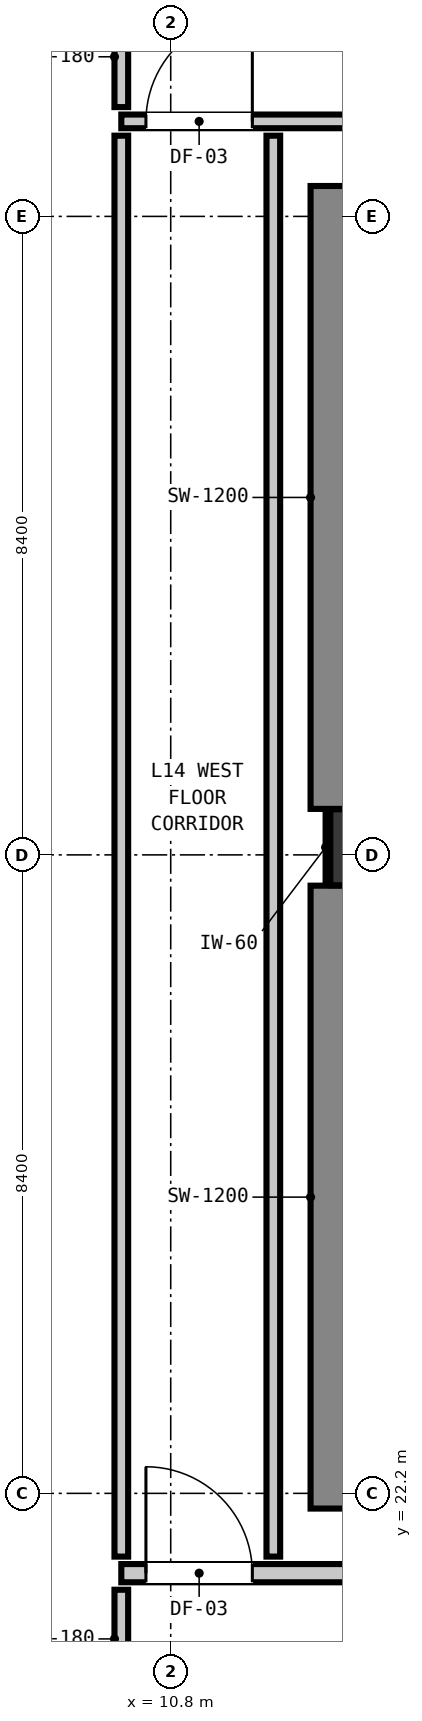
"""IFC4 building model, lengths in metres.
Left out: names, types, materials, properties, quantities, classifications, styles, units other than length and angle.
Written with IfcOpenShell. Run it as: python <this file> out.ifc"""

import sys

from ifc_helpers import new_model, si_unit, direction, frame, frame_2d, origin, origin_2d, place, context, subcontext, project, spatial, rectangle, extrude, element, fill, save


model = new_model("IFC4")
c1 = context("Model", 3, precision=1e-05, world=origin(), true_north=direction((0.0, 1.0)))
c2 = subcontext(c1, "Body", "Model", "MODEL_VIEW")
j1 = project(units=[si_unit("LENGTHUNIT", "METRE"), si_unit("PLANEANGLEUNIT", "RADIAN")], contexts=[c1])
p1 = place(None, origin())
s1 = spatial("IfcSite", under=j1, at=p1, CompositionType="ELEMENT")
p2 = place(p1, origin())
s2 = spatial("IfcBuilding", under=s1, at=p2, CompositionType="ELEMENT")
p3 = place(p2, frame((0.0, 0.0, 51.88)))
s3 = spatial("IfcBuildingStorey", under=s2, at=p3, CompositionType="ELEMENT", Elevation=51.88)
p4 = place(p3, frame((13.4, 30.7, 0.0), z_axis=(0.0, 0.0, 1.0), x_axis=(1.0, 0.0, 0.0)))
e1 = element("IfcColumn", 1, at=p4, inside=s3, PredefinedType="COLUMN", context=c2, shape_type="SweptSolid", body=[
    extrude(rectangle(XDim=1.0, YDim=1.0, at=origin_2d()), origin(), (0.0, 0.0, 1.0), 3.32),
])
p5 = place(p3, frame((13.24, 22.0, 0.0), z_axis=(0.0, 0.0, 1.0), x_axis=(0.0, 1.0, 0.0)))
e2 = element("IfcWall", 2, at=p5, inside=s3, PredefinedType="SHEAR", context=c2, shape_type="SweptSolid", body=[
    extrude(rectangle(XDim=8.195, YDim=1.2, at=frame_2d((4.098, 0.0))), origin(), (0.0, 0.0, 1.0), 3.32),
])
p6 = place(p3, frame((13.24, 31.205, 0.0), z_axis=(0.0, 0.0, 1.0), x_axis=(0.0, 1.0, 0.0)))
e3 = element("IfcWall", 3, at=p6, inside=s3, PredefinedType="SHEAR", context=c2, shape_type="SweptSolid", body=[
    extrude(rectangle(XDim=8.195, YDim=1.2, at=frame_2d((4.097, 0.0))), origin(), (0.0, 0.0, 1.0), 3.32),
])
p7 = place(p3, frame((10.15, 21.15, 0.0), z_axis=(0.0, 0.0, 1.0), x_axis=(1.0, 0.0, 0.0)))
e4 = element("IfcWall", 4, at=p7, inside=s3, PredefinedType="PARTITIONING", context=c2, shape_type="SweptSolid", body=[
    extrude(rectangle(XDim=40.023, YDim=0.24, at=frame_2d((20.012, 0.0))), origin(), (0.0, 0.0, 1.0), 3.06),
])
p8 = place(p7, frame((8.06, 0.0, 0.0)))
e5 = element("IfcOpeningElement", 5, at=p8, cuts=e4, PredefinedType="OPENING", context=c2, shape_type="SweptSolid", body=[
    extrude(rectangle(XDim=1.1, YDim=2.15, at=frame_2d((0.55, 1.075))), frame((0.0, 0.13, 0.0), z_axis=(0.0, -1.0, 0.0), x_axis=(1.0, 0.0, 0.0)), (0.0, 0.0, 1.0), 0.26),
])
p9 = place(p7, frame((0.324, 0.0, 0.0)))
e6 = element("IfcOpeningElement", 6, at=p9, cuts=e4, PredefinedType="OPENING", context=c2, shape_type="SweptSolid", body=[
    extrude(rectangle(XDim=1.4, YDim=2.15, at=frame_2d((0.7, 1.075))), frame((0.0, 0.13, 0.0), z_axis=(0.0, -1.0, 0.0), x_axis=(1.0, 0.0, 0.0)), (0.0, 0.0, 1.0), 0.26),
])
p10 = place(p7, frame((33.351, 0.0, 0.0)))
e7 = element("IfcOpeningElement", 7, at=p10, cuts=e4, PredefinedType="OPENING", context=c2, shape_type="SweptSolid", body=[
    extrude(rectangle(XDim=0.9, YDim=2.1, at=frame_2d((0.45, 1.05))), frame((0.0, 0.13, 0.0), z_axis=(0.0, -1.0, 0.0), x_axis=(1.0, 0.0, 0.0)), (0.0, 0.0, 1.0), 0.26),
])
p11 = place(p3, frame((10.15, 40.25, 0.0), z_axis=(0.0, 0.0, 1.0), x_axis=(1.0, 0.0, 0.0)))
e8 = element("IfcWall", 8, at=p11, inside=s3, PredefinedType="PARTITIONING", context=c2, shape_type="SweptSolid", body=[
    extrude(rectangle(XDim=26.782, YDim=0.18, at=frame_2d((13.391, 0.0))), origin(), (0.0, 0.0, 1.0), 3.06),
])
p12 = place(p11, frame((7.285, 0.0, 0.0)))
e9 = element("IfcOpeningElement", 9, at=p12, cuts=e8, PredefinedType="OPENING", context=c2, shape_type="SweptSolid", body=[
    extrude(rectangle(XDim=1.4, YDim=2.15, at=frame_2d((0.7, 1.075))), frame((0.0, 0.1, 0.0), z_axis=(0.0, -1.0, 0.0), x_axis=(1.0, 0.0, 0.0)), (0.0, 0.0, 1.0), 0.2),
])
p13 = place(p11, frame((0.324, 0.0, 0.0)))
e10 = element("IfcOpeningElement", 10, at=p13, cuts=e8, PredefinedType="OPENING", context=c2, shape_type="SweptSolid", body=[
    extrude(rectangle(XDim=1.4, YDim=2.15, at=frame_2d((0.7, 1.075))), frame((0.0, 0.1, 0.0), z_axis=(0.0, -1.0, 0.0), x_axis=(1.0, 0.0, 0.0)), (0.0, 0.0, 1.0), 0.2),
])
p14 = place(p3, frame((10.15, 19.638, 0.0), z_axis=(0.0, 0.0, 1.0), x_axis=(0.0, 1.0, 0.0)))
e11 = element("IfcWall", 11, at=p14, inside=s3, PredefinedType="PARTITIONING", context=c2, shape_type="SweptSolid", body=[
    extrude(rectangle(XDim=1.294, YDim=0.18, at=frame_2d((0.647, 0.0))), origin(), (0.0, 0.0, 1.0), 3.06),
])
p15 = place(p3, frame((10.15, 21.368, 0.0), z_axis=(0.0, 0.0, 1.0), x_axis=(0.0, 1.0, 0.0)))
e12 = element("IfcWall", 12, at=p15, inside=s3, PredefinedType="PARTITIONING", context=c2, shape_type="SweptSolid", body=[
    extrude(rectangle(XDim=18.694, YDim=0.18, at=frame_2d((9.347, 0.0))), origin(), (0.0, 0.0, 1.0), 3.06),
])
p16 = place(p3, frame((10.15, 40.438, 0.0), z_axis=(0.0, 0.0, 1.0), x_axis=(0.0, 1.0, 0.0)))
e13 = element("IfcWall", 13, at=p16, inside=s3, PredefinedType="PARTITIONING", context=c2, shape_type="SweptSolid", body=[
    extrude(rectangle(XDim=1.324, YDim=0.18, at=frame_2d((0.662, 0.0))), origin(), (0.0, 0.0, 1.0), 2.445),
])
p17 = place(p3, frame((12.15, 21.368, 0.0), z_axis=(0.0, 0.0, 1.0), x_axis=(0.0, 1.0, 0.0)))
e14 = element("IfcWall", 14, at=p17, inside=s3, PredefinedType="PARTITIONING", context=c2, shape_type="SweptSolid", body=[
    extrude(rectangle(XDim=18.694, YDim=0.18, at=frame_2d((9.347, 0.0))), origin(), (0.0, 0.0, 1.0), 3.06),
])
p18 = place(p3, frame((12.868, 30.21, 0.0), z_axis=(0.0, 0.0, 1.0), x_axis=(0.0, 1.0, 0.0)))
e15 = element("IfcWall", 15, at=p18, inside=s3, PredefinedType="PARTITIONING", context=c2, shape_type="SweptSolid", body=[
    extrude(rectangle(XDim=0.98, YDim=0.06, at=frame_2d((0.49, 0.0))), origin(), (0.0, 0.0, 1.0), 1.45),
])
p19 = place(p9, origin())
e16 = element("IfcDoor", 16, at=p19, inside=s3, OperationType="SINGLE_SWING_LEFT", PredefinedType="DOOR", context=c2, shape_type="SweptSolid", body=[
    extrude(rectangle(XDim=1.4, YDim=2.15, at=frame_2d((0.7, 1.075))), frame((0.0, 0.025, 0.0), z_axis=(0.0, -1.0, 0.0), x_axis=(1.0, 0.0, 0.0)), (0.0, 0.0, 1.0), 0.05),
])
fill(e6, e16)
p20 = place(p13, origin())
e17 = element("IfcDoor", 17, at=p20, inside=s3, OperationType="SINGLE_SWING_RIGHT", PredefinedType="DOOR", context=c2, shape_type="SweptSolid", body=[
    extrude(rectangle(XDim=1.4, YDim=2.15, at=frame_2d((0.7, 1.075))), frame((0.0, 0.025, 0.0), z_axis=(0.0, -1.0, 0.0), x_axis=(1.0, 0.0, 0.0)), (0.0, 0.0, 1.0), 0.05),
])
fill(e10, e17)
save(model, sys.argv[1])
